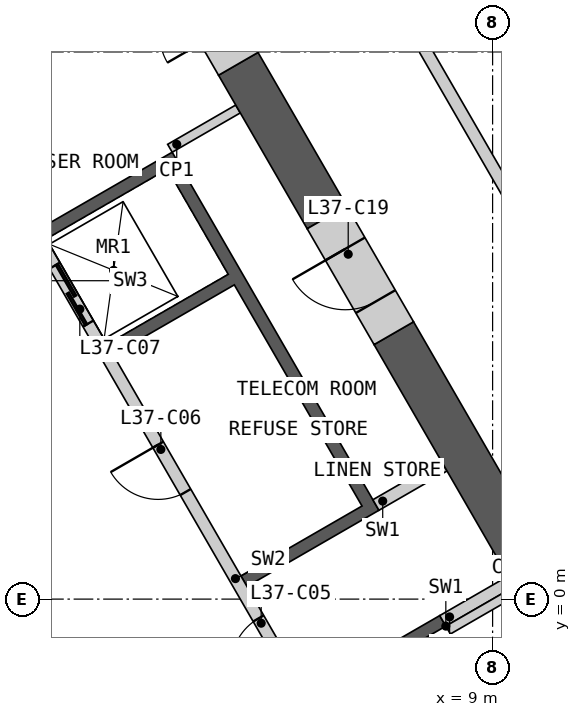
"""IFC4 building model, lengths in metres.
Left out: names, types, materials, properties, quantities, classifications, styles, units other than length and angle.
Written with IfcOpenShell. Run it as: python <this file> out.ifc"""

import sys

from ifc_helpers import new_model, si_unit, direction, frame, frame_2d, origin, place, context, subcontext, project, spatial, polyline, rectangle, outline, extrude, element, fill, save


model = new_model("IFC4")
c1 = context("Model", 3, precision=1e-05, world=origin(), true_north=direction((0.0, 1.0)))
c2 = subcontext(c1, "Body", "Model", "MODEL_VIEW")
j1 = project(units=[si_unit("LENGTHUNIT", "METRE"), si_unit("PLANEANGLEUNIT", "RADIAN")], contexts=[c1])
p1 = place(None, origin())
s1 = spatial("IfcSite", under=j1, at=p1, CompositionType="ELEMENT")
p2 = place(p1, origin())
s2 = spatial("IfcBuilding", under=s1, at=p2, CompositionType="ELEMENT")
p3 = place(p2, frame((0.0, 0.0, 176.4)))
s3 = spatial("IfcBuildingStorey", under=s2, at=p3, CompositionType="ELEMENT", Elevation=176.4)
p4 = place(p3, origin())
e1 = element("IfcWall", 1, at=p4, inside=s3, PredefinedType="SHEAR", context=c2, shape_type="SweptSolid", body=[
    extrude(outline(polyline([(1.561, 6.097), (3.731, 7.35), (7.131, 1.461), (4.96, 0.208), (4.861, 0.381), (6.852, 1.531), (4.752, 5.169), (2.76, 4.019), (2.66, 4.192), (4.652, 5.342), (3.652, 7.074), (1.66, 5.924), (1.561, 6.097)])), origin(), (0.0, 0.0, 1.0), 3.25),
])
p5 = place(p3, origin())
e2 = element("IfcWall", 2, at=p5, inside=s3, PredefinedType="SHEAR", context=c2, shape_type="SweptSolid", body=[
    extrude(outline(polyline([(8.231, -0.444), (6.061, -1.697), (5.96, -1.524), (8.131, -0.271), (8.231, -0.444)])), origin(), (0.0, 0.0, 1.0), 3.25),
])
p6 = place(p3, frame((5.817, -1.476, 0.0), z_axis=(0.0, 0.0, 1.0), x_axis=(-0.500002616675, 0.866023893041, 0.0)))
e3 = element("IfcWall", 3, at=p6, inside=s3, PredefinedType="SOLIDWALL", context=c2, shape_type="SweptSolid", body=[
    extrude(rectangle(XDim=8.373, YDim=0.2, at=frame_2d((4.187, 0.0))), origin(), (0.0, 0.0, 1.0), 3.25),
])
p7 = place(p6, frame((0.437, 0.0, 0.0)))
e4 = element("IfcOpeningElement", 4, at=p7, cuts=e3, PredefinedType="OPENING", context=c2, shape_type="SweptSolid", body=[
    extrude(rectangle(XDim=0.9, YDim=2.1, at=frame_2d((0.45, 1.05))), frame((0.0, 0.11, 0.0), z_axis=(0.0, -1.0, 0.0), x_axis=(1.0, 0.0, 0.0)), (0.0, 0.0, 1.0), 0.22),
])
p8 = place(p6, frame((3.737, 0.0, 0.0)))
e5 = element("IfcOpeningElement", 5, at=p8, cuts=e3, PredefinedType="OPENING", context=c2, shape_type="SweptSolid", body=[
    extrude(rectangle(XDim=0.9, YDim=2.1, at=frame_2d((0.45, 1.05))), frame((0.0, 0.11, 0.0), z_axis=(0.0, -1.0, 0.0), x_axis=(1.0, 0.0, 0.0)), (0.0, 0.0, 1.0), 0.22),
])
p9 = place(p6, frame((6.937, 0.0, 0.0)))
e6 = element("IfcOpeningElement", 6, at=p9, cuts=e3, PredefinedType="OPENING", context=c2, shape_type="SweptSolid", body=[
    extrude(rectangle(XDim=1.1, YDim=2.1, at=frame_2d((0.55, 1.05))), frame((0.0, 0.11, 0.0), z_axis=(0.0, -1.0, 0.0), x_axis=(1.0, 0.0, 0.0)), (0.0, 0.0, 1.0), 0.22),
])
for number, where, z_axis, x_axis in (
    (7, (8.181, -0.357, 0.0), (0.0, 0.0, 1.0), (0.866, 0.5, 0.0)),
    (8, (7.081, 1.548, 0.0), (0.0, 0.0, 1.0), (0.866, 0.5, 0.0)),
):
    element("IfcWall", number, at=place(p3, frame(where, z_axis=z_axis, x_axis=x_axis)), inside=s3, PredefinedType="SHEAR", context=c2, shape_type="SweptSolid", body=[
        extrude(rectangle(XDim=1.293, YDim=0.2, at=frame_2d((0.646, 0.0))), origin(), (0.0, 0.0, 1.0), 3.25),
    ])
for number, where, z_axis, x_axis in (
    (9, (3.693, 7.415, 0.0), (0.0, 0.0, 1.0), (0.866, 0.5, 0.0)),
    (10, (8.268, -0.509, 0.0), (0.0, 0.0, 1.0), (0.866, 0.5, 0.0)),
):
    element("IfcWall", number, at=place(p3, frame(where, z_axis=z_axis, x_axis=x_axis)), inside=s3, PredefinedType="PARTITIONING", context=c2, shape_type="SweptSolid", body=[
        extrude(rectangle(XDim=1.293, YDim=0.15, at=frame_2d((0.646, 0.0))), origin(), (0.0, 0.0, 1.0), 3.25),
    ])
p10 = place(p3, frame((14.526, -8.011, 0.0), z_axis=(0.0, 0.0, 1.0), x_axis=(-0.499994855372, 0.866028374016, 0.0)))
e11 = element("IfcWall", 11, at=p10, inside=s3, PredefinedType="SHEAR", context=c2, shape_type="SweptSolid", body=[
    extrude(rectangle(XDim=14.301, YDim=0.75, at=frame_2d((7.15, 0.0))), origin(), (0.0, 0.0, 1.0), 3.25),
])
p11 = place(p3, frame((6.275, 6.279, 0.0), z_axis=(0.0, 0.0, 1.0), x_axis=(-0.500029273391, 0.866008502124, 0.0)))
e12 = element("IfcWall", 12, at=p11, inside=s3, PredefinedType="SHEAR", context=c2, shape_type="SweptSolid", body=[
    extrude(rectangle(XDim=2.916, YDim=0.75, at=frame_2d((1.458, 0.0))), origin(), (0.0, 0.0, 1.0), 3.25),
])
p12 = place(p3, frame((7.375, 4.374, 0.0), z_axis=(0.0, 0.0, 1.0), x_axis=(-0.499946605688, 0.86605622881, 0.0)))
e13 = element("IfcWall", 13, at=p12, inside=s3, PredefinedType="SHEAR", context=c2, shape_type="SweptSolid", body=[
    extrude(rectangle(XDim=2.2, YDim=0.75, at=frame_2d((1.1, 0.0))), origin(), (0.0, 0.0, 1.0), 3.25),
])
p13 = place(p12, frame((0.6, 0.0, 0.0)))
e14 = element("IfcOpeningElement", 14, at=p13, cuts=e13, PredefinedType="OPENING", context=c2, shape_type="SweptSolid", body=[
    extrude(rectangle(XDim=1.0, YDim=2.1, at=frame_2d((0.5, 1.05))), frame((0.0, 0.385, 0.0), z_axis=(0.0, -1.0, 0.0), x_axis=(1.0, 0.0, 0.0)), (0.0, 0.0, 1.0), 0.77),
])
p14 = place(p3, frame((4.817, 8.804, 0.0), z_axis=(0.0, 0.0, 1.0), x_axis=(-0.50002983664, 0.866008176907, 0.0)))
e15 = element("IfcWall", 15, at=p14, inside=s3, PredefinedType="SHEAR", context=c2, shape_type="SweptSolid", body=[
    extrude(rectangle(XDim=2.2, YDim=0.75, at=frame_2d((1.1, 0.0))), origin(), (0.0, 0.0, 1.0), 3.25),
])
p15 = place(p14, frame((0.6, 0.0, 0.0)))
e16 = element("IfcOpeningElement", 16, at=p15, cuts=e15, PredefinedType="OPENING", context=c2, shape_type="SweptSolid", body=[
    extrude(rectangle(XDim=1.0, YDim=2.1, at=frame_2d((0.5, 1.05))), frame((0.0, 0.385, 0.0), z_axis=(0.0, -1.0, 0.0), x_axis=(1.0, 0.0, 0.0)), (0.0, 0.0, 1.0), 0.77),
])
p16 = place(p3, frame((5.038, 13.972, 0.0), z_axis=(0.0, 0.0, 1.0), x_axis=(0.50000393355, -0.866023132736, 0.0)))
e17 = element("IfcWall", 17, at=p16, inside=s3, PredefinedType="PARTITIONING", context=c2, shape_type="SweptSolid", body=[
    extrude(rectangle(XDim=9.335, YDim=0.2, at=frame_2d((4.667, 0.0))), origin(), (0.0, 0.0, 1.0), 3.25),
])
p17 = place(p16, frame((1.154, 0.0, 0.0)))
e18 = element("IfcOpeningElement", 18, at=p17, cuts=e17, PredefinedType="OPENING", context=c2, shape_type="SweptSolid", body=[
    extrude(rectangle(XDim=1.1, YDim=2.1, at=frame_2d((0.55, 1.05))), frame((0.0, 0.11, 0.0), z_axis=(0.0, -1.0, 0.0), x_axis=(1.0, 0.0, 0.0)), (0.0, 0.0, 1.0), 0.22),
])
p18 = place(p7, origin())
e19 = element("IfcDoor", 19, at=p18, inside=s3, OperationType="SINGLE_SWING_LEFT", PredefinedType="DOOR", context=c2, shape_type="SweptSolid", body=[
    extrude(rectangle(XDim=0.9, YDim=2.1, at=frame_2d((0.45, 1.05))), frame((0.0, 0.025, 0.0), z_axis=(0.0, -1.0, 0.0), x_axis=(1.0, 0.0, 0.0)), (0.0, 0.0, 1.0), 0.05),
])
fill(e4, e19)
p19 = place(p8, origin())
e20 = element("IfcDoor", 20, at=p19, inside=s3, OperationType="SINGLE_SWING_RIGHT", PredefinedType="DOOR", context=c2, shape_type="SweptSolid", body=[
    extrude(rectangle(XDim=0.9, YDim=2.1, at=frame_2d((0.45, 1.05))), frame((0.0, 0.025, 0.0), z_axis=(0.0, -1.0, 0.0), x_axis=(1.0, 0.0, 0.0)), (0.0, 0.0, 1.0), 0.05),
])
fill(e5, e20)
p20 = place(p9, origin())
e21 = element("IfcDoor", 21, at=p20, inside=s3, OperationType="SLIDING_TO_LEFT", PredefinedType="DOOR", context=c2, shape_type="SweptSolid", body=[
    extrude(rectangle(XDim=1.1, YDim=2.1, at=frame_2d((0.55, 1.05))), frame((0.0, 0.025, 0.0), z_axis=(0.0, -1.0, 0.0), x_axis=(1.0, 0.0, 0.0)), (0.0, 0.0, 1.0), 0.05),
])
fill(e6, e21)
p21 = place(p13, origin())
e22 = element("IfcDoor", 22, at=p21, inside=s3, OperationType="SINGLE_SWING_RIGHT", PredefinedType="DOOR", context=c2, shape_type="SweptSolid", body=[
    extrude(rectangle(XDim=1.0, YDim=2.1, at=frame_2d((0.5, 1.05))), frame((0.0, 0.13, 0.0), z_axis=(0.0, -1.0, 0.0), x_axis=(1.0, 0.0, 0.0)), (0.0, 0.0, 1.0), 0.05),
])
fill(e14, e22)
save(model, sys.argv[1])
